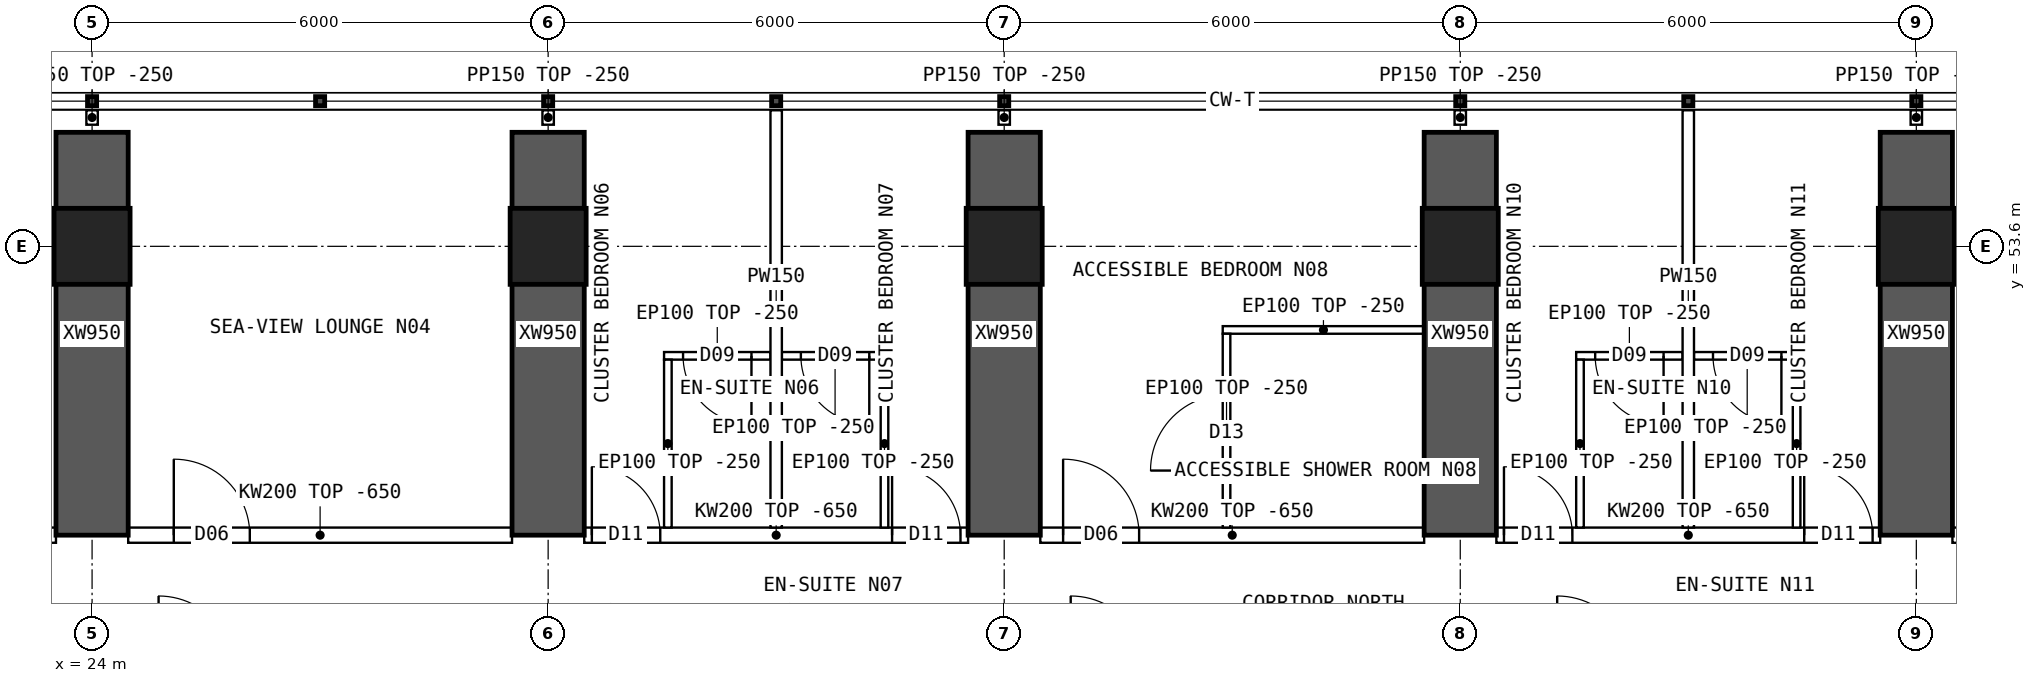
"""IFC4 building model, lengths in metres.
Left out: names, types, materials, properties, quantities, classifications, styles, units other than length and angle.
Written with IfcOpenShell. Run it as: python <this file> out.ifc"""

import sys

from ifc_helpers import new_model, si_unit, direction, frame, frame_2d, origin, origin_2d, place, context, subcontext, project, spatial, polyline, rectangle, hollow_rectangle, outline, extrude, element, fill, save


model = new_model("IFC4")
c1 = context("Model", 3, precision=1e-05, world=origin(), true_north=direction((0.0, 1.0)))
c2 = subcontext(c1, "Body", "Model", "MODEL_VIEW")
j1 = project(units=[si_unit("LENGTHUNIT", "METRE"), si_unit("PLANEANGLEUNIT", "RADIAN")], contexts=[c1])
p1 = place(None, origin())
s1 = spatial("IfcSite", under=j1, at=p1, CompositionType="ELEMENT")
p2 = place(p1, origin())
s2 = spatial("IfcBuilding", under=s1, at=p2, CompositionType="ELEMENT")
p3 = place(p2, frame((0.0, 0.0, 99.4)))
s3 = spatial("IfcBuildingStorey", under=s2, at=p3, CompositionType="ELEMENT", Elevation=99.4)
for number, where, z_axis, x_axis in (
    (1, (24.0, 53.6, 0.0), (0.0, 0.0, 1.0), (1.0, 0.0, 0.0)),
    (2, (30.0, 53.6, 0.0), (0.0, 0.0, 1.0), (1.0, 0.0, 0.0)),
    (3, (36.0, 53.6, 0.0), (0.0, 0.0, 1.0), (1.0, 0.0, 0.0)),
    (4, (42.0, 53.6, 0.0), (0.0, 0.0, 1.0), (1.0, 0.0, 0.0)),
    (5, (48.0, 53.6, 0.0), (0.0, 0.0, 1.0), (1.0, 0.0, 0.0)),
):
    element("IfcColumn", number, at=place(p3, frame(where, z_axis=z_axis, x_axis=x_axis)), inside=s3, PredefinedType="COLUMN", context=c2, shape_type="SweptSolid", body=[
        extrude(hollow_rectangle(XDim=1.0, YDim=1.0, WallThickness=0.1, at=origin_2d()), origin(), (0.0, 0.0, 1.0), 3.75),
    ])
for number, where, z_axis, x_axis in (
    (6, (24.0, 49.8, 0.0), (0.0, 0.0, 1.0), (0.0, 1.0, 0.0)),
    (7, (30.0, 49.8, 0.0), (0.0, 0.0, 1.0), (0.0, 1.0, 0.0)),
    (8, (36.0, 49.8, 0.0), (0.0, 0.0, 1.0), (0.0, 1.0, 0.0)),
    (9, (42.0, 49.8, 0.0), (0.0, 0.0, 1.0), (0.0, 1.0, 0.0)),
    (10, (48.0, 49.8, 0.0), (0.0, 0.0, 1.0), (0.0, 1.0, 0.0)),
):
    element("IfcWall", number, at=place(p3, frame(where, z_axis=z_axis, x_axis=x_axis)), inside=s3, PredefinedType="SHEAR", context=c2, shape_type="SweptSolid", body=[
        extrude(rectangle(XDim=5.3, YDim=0.95, at=frame_2d((2.65, 0.0))), origin(), (0.0, 0.0, 1.0), 3.75),
    ])
p4 = place(p3, frame((18.475, 49.8, 0.0), z_axis=(0.0, 0.0, 1.0), x_axis=(1.0, 0.0, 0.0)))
e11 = element("IfcWall", 11, at=p4, inside=s3, PredefinedType="SOLIDWALL", context=c2, shape_type="SweptSolid", body=[
    extrude(outline(polyline([(0.0, 0.0), (5.05, 0.0), (5.05, 3.1), (0.0, 3.1), (0.0, 0.0)])), frame((0.0, 0.1, 0.0), z_axis=(0.0, -1.0, 0.0), x_axis=(1.0, 0.0, 0.0)), (0.0, 0.0, 1.0), 0.2),
])
p5 = place(p4, frame((0.1, 0.0, 0.0)))
e12 = element("IfcOpeningElement", 12, at=p5, cuts=e11, PredefinedType="OPENING", context=c2, shape_type="SweptSolid", body=[
    extrude(rectangle(XDim=0.9, YDim=2.1, at=frame_2d((0.45, 1.05))), frame((0.0, 0.11, 0.0), z_axis=(0.0, -1.0, 0.0), x_axis=(1.0, 0.0, 0.0)), (0.0, 0.0, 1.0), 0.22),
])
p6 = place(p4, frame((4.05, 0.0, 0.0)))
e13 = element("IfcOpeningElement", 13, at=p6, cuts=e11, PredefinedType="OPENING", context=c2, shape_type="SweptSolid", body=[
    extrude(rectangle(XDim=0.9, YDim=2.1, at=frame_2d((0.45, 1.05))), frame((0.0, 0.11, 0.0), z_axis=(0.0, -1.0, 0.0), x_axis=(1.0, 0.0, 0.0)), (0.0, 0.0, 1.0), 0.22),
])
p7 = place(p3, frame((24.475, 49.8, 0.0), z_axis=(0.0, 0.0, 1.0), x_axis=(1.0, 0.0, 0.0)))
e14 = element("IfcWall", 14, at=p7, inside=s3, PredefinedType="SOLIDWALL", context=c2, shape_type="SweptSolid", body=[
    extrude(outline(polyline([(0.0, 0.0), (5.05, 0.0), (5.05, 3.1), (0.0, 3.1), (0.0, 0.0)])), frame((0.0, 0.1, 0.0), z_axis=(0.0, -1.0, 0.0), x_axis=(1.0, 0.0, 0.0)), (0.0, 0.0, 1.0), 0.2),
])
p8 = place(p7, frame((0.6, 0.0, 0.0)))
e15 = element("IfcOpeningElement", 15, at=p8, cuts=e14, PredefinedType="OPENING", context=c2, shape_type="SweptSolid", body=[
    extrude(rectangle(XDim=1.0, YDim=2.1, at=frame_2d((0.5, 1.05))), frame((0.0, 0.11, 0.0), z_axis=(0.0, -1.0, 0.0), x_axis=(1.0, 0.0, 0.0)), (0.0, 0.0, 1.0), 0.22),
])
p9 = place(p3, frame((30.475, 49.8, 0.0), z_axis=(0.0, 0.0, 1.0), x_axis=(1.0, 0.0, 0.0)))
e16 = element("IfcWall", 16, at=p9, inside=s3, PredefinedType="SOLIDWALL", context=c2, shape_type="SweptSolid", body=[
    extrude(outline(polyline([(0.0, 0.0), (5.05, 0.0), (5.05, 3.1), (0.0, 3.1), (0.0, 0.0)])), frame((0.0, 0.1, 0.0), z_axis=(0.0, -1.0, 0.0), x_axis=(1.0, 0.0, 0.0)), (0.0, 0.0, 1.0), 0.2),
])
p10 = place(p9, frame((0.1, 0.0, 0.0)))
e17 = element("IfcOpeningElement", 17, at=p10, cuts=e16, PredefinedType="OPENING", context=c2, shape_type="SweptSolid", body=[
    extrude(rectangle(XDim=0.9, YDim=2.1, at=frame_2d((0.45, 1.05))), frame((0.0, 0.11, 0.0), z_axis=(0.0, -1.0, 0.0), x_axis=(1.0, 0.0, 0.0)), (0.0, 0.0, 1.0), 0.22),
])
p11 = place(p9, frame((4.05, 0.0, 0.0)))
e18 = element("IfcOpeningElement", 18, at=p11, cuts=e16, PredefinedType="OPENING", context=c2, shape_type="SweptSolid", body=[
    extrude(rectangle(XDim=0.9, YDim=2.1, at=frame_2d((0.45, 1.05))), frame((0.0, 0.11, 0.0), z_axis=(0.0, -1.0, 0.0), x_axis=(1.0, 0.0, 0.0)), (0.0, 0.0, 1.0), 0.22),
])
p12 = place(p3, frame((36.475, 49.8, 0.0), z_axis=(0.0, 0.0, 1.0), x_axis=(1.0, 0.0, 0.0)))
e19 = element("IfcWall", 19, at=p12, inside=s3, PredefinedType="SOLIDWALL", context=c2, shape_type="SweptSolid", body=[
    extrude(outline(polyline([(0.0, 0.0), (5.05, 0.0), (5.05, 3.1), (0.0, 3.1), (0.0, 0.0)])), frame((0.0, 0.1, 0.0), z_axis=(0.0, -1.0, 0.0), x_axis=(1.0, 0.0, 0.0)), (0.0, 0.0, 1.0), 0.2),
])
p13 = place(p12, frame((0.3, 0.0, 0.0)))
e20 = element("IfcOpeningElement", 20, at=p13, cuts=e19, PredefinedType="OPENING", context=c2, shape_type="SweptSolid", body=[
    extrude(rectangle(XDim=1.0, YDim=2.1, at=frame_2d((0.5, 1.05))), frame((0.0, 0.11, 0.0), z_axis=(0.0, -1.0, 0.0), x_axis=(1.0, 0.0, 0.0)), (0.0, 0.0, 1.0), 0.22),
])
p14 = place(p3, frame((42.475, 49.8, 0.0), z_axis=(0.0, 0.0, 1.0), x_axis=(1.0, 0.0, 0.0)))
e21 = element("IfcWall", 21, at=p14, inside=s3, PredefinedType="SOLIDWALL", context=c2, shape_type="SweptSolid", body=[
    extrude(outline(polyline([(0.0, 0.0), (5.05, 0.0), (5.05, 3.1), (0.0, 3.1), (0.0, 0.0)])), frame((0.0, 0.1, 0.0), z_axis=(0.0, -1.0, 0.0), x_axis=(1.0, 0.0, 0.0)), (0.0, 0.0, 1.0), 0.2),
])
p15 = place(p14, frame((0.1, 0.0, 0.0)))
e22 = element("IfcOpeningElement", 22, at=p15, cuts=e21, PredefinedType="OPENING", context=c2, shape_type="SweptSolid", body=[
    extrude(rectangle(XDim=0.9, YDim=2.1, at=frame_2d((0.45, 1.05))), frame((0.0, 0.11, 0.0), z_axis=(0.0, -1.0, 0.0), x_axis=(1.0, 0.0, 0.0)), (0.0, 0.0, 1.0), 0.22),
])
p16 = place(p14, frame((4.05, 0.0, 0.0)))
e23 = element("IfcOpeningElement", 23, at=p16, cuts=e21, PredefinedType="OPENING", context=c2, shape_type="SweptSolid", body=[
    extrude(rectangle(XDim=0.9, YDim=2.1, at=frame_2d((0.45, 1.05))), frame((0.0, 0.11, 0.0), z_axis=(0.0, -1.0, 0.0), x_axis=(1.0, 0.0, 0.0)), (0.0, 0.0, 1.0), 0.22),
])
p17 = place(p3, frame((48.475, 49.8, 0.0), z_axis=(0.0, 0.0, 1.0), x_axis=(1.0, 0.0, 0.0)))
e24 = element("IfcWall", 24, at=p17, inside=s3, PredefinedType="SOLIDWALL", context=c2, shape_type="SweptSolid", body=[
    extrude(outline(polyline([(0.0, 0.0), (5.05, 0.0), (5.05, 3.1), (0.0, 3.1), (0.0, 0.0)])), frame((0.0, 0.1, 0.0), z_axis=(0.0, -1.0, 0.0), x_axis=(1.0, 0.0, 0.0)), (0.0, 0.0, 1.0), 0.2),
])
p18 = place(p17, frame((0.6, 0.0, 0.0)))
e25 = element("IfcOpeningElement", 25, at=p18, cuts=e24, PredefinedType="OPENING", context=c2, shape_type="SweptSolid", body=[
    extrude(rectangle(XDim=1.0, YDim=2.1, at=frame_2d((0.5, 1.05))), frame((0.0, 0.11, 0.0), z_axis=(0.0, -1.0, 0.0), x_axis=(1.0, 0.0, 0.0)), (0.0, 0.0, 1.0), 0.22),
])
p19 = place(p3, frame((33.0, 55.39, 0.0), z_axis=(0.0, 0.0, 1.0), x_axis=(0.0, -1.0, 0.0)))
e26 = element("IfcWall", 26, at=p19, inside=s3, PredefinedType="PARTITIONING", context=c2, shape_type="SweptSolid", body=[
    extrude(outline(polyline([(0.0, 0.0), (5.49, 0.0), (5.49, 3.1), (5.442, 3.1), (5.44, 3.5), (1.992, 3.5), (1.99, 3.1), (1.592, 3.1), (1.59, 3.5), (0.0, 3.5), (0.0, 0.0)])), frame((0.0, 0.075, 0.0), z_axis=(0.0, -1.0, 0.0), x_axis=(1.0, 0.0, 0.0)), (0.0, 0.0, 1.0), 0.15),
])
p20 = place(p3, frame((31.525, 52.159, 0.0), z_axis=(0.0, 0.0, 1.0), x_axis=(1.0, 0.0, 0.0)))
e27 = element("IfcWall", 27, at=p20, inside=s3, PredefinedType="PARTITIONING", context=c2, shape_type="SweptSolid", body=[
    extrude(rectangle(XDim=1.4, YDim=0.1, at=frame_2d((0.7, 0.0))), origin(), (0.0, 0.0, 1.0), 3.5),
])
p21 = place(p20, frame((0.25, 0.0, 0.0)))
e28 = element("IfcOpeningElement", 28, at=p21, cuts=e27, PredefinedType="OPENING", context=c2, shape_type="SweptSolid", body=[
    extrude(rectangle(XDim=0.9, YDim=2.1, at=frame_2d((0.45, 1.05))), frame((0.0, 0.06, 0.0), z_axis=(0.0, -1.0, 0.0), x_axis=(1.0, 0.0, 0.0)), (0.0, 0.0, 1.0), 0.12),
])
p22 = place(p3, frame((31.575, 52.109, 0.0), z_axis=(0.0, 0.0, 1.0), x_axis=(0.0, -1.0, 0.0)))
e29 = element("IfcWall", 29, at=p22, inside=s3, PredefinedType="PARTITIONING", context=c2, shape_type="SweptSolid", body=[
    extrude(outline(polyline([(0.0, 0.0), (2.209, 0.0), (2.209, 3.1), (2.161, 3.1), (2.159, 3.5), (0.0, 3.5), (0.0, 0.0)])), frame((0.0, 0.05, 0.0), z_axis=(0.0, -1.0, 0.0), x_axis=(1.0, 0.0, 0.0)), (0.0, 0.0, 1.0), 0.1),
])
p23 = place(p3, frame((33.075, 52.159, 0.0), z_axis=(0.0, 0.0, 1.0), x_axis=(1.0, 0.0, 0.0)))
e30 = element("IfcWall", 30, at=p23, inside=s3, PredefinedType="PARTITIONING", context=c2, shape_type="SweptSolid", body=[
    extrude(rectangle(XDim=1.4, YDim=0.1, at=frame_2d((0.7, 0.0))), origin(), (0.0, 0.0, 1.0), 3.5),
])
p24 = place(p23, frame((0.25, 0.0, 0.0)))
e31 = element("IfcOpeningElement", 31, at=p24, cuts=e30, PredefinedType="OPENING", context=c2, shape_type="SweptSolid", body=[
    extrude(rectangle(XDim=0.9, YDim=2.1, at=frame_2d((0.45, 1.05))), frame((0.0, 0.06, 0.0), z_axis=(0.0, -1.0, 0.0), x_axis=(1.0, 0.0, 0.0)), (0.0, 0.0, 1.0), 0.12),
])
p25 = place(p3, frame((34.425, 52.109, 0.0), z_axis=(0.0, 0.0, 1.0), x_axis=(0.0, -1.0, 0.0)))
e32 = element("IfcWall", 32, at=p25, inside=s3, PredefinedType="PARTITIONING", context=c2, shape_type="SweptSolid", body=[
    extrude(outline(polyline([(0.0, 0.0), (2.209, 0.0), (2.209, 3.1), (2.161, 3.1), (2.159, 3.5), (0.0, 3.5), (0.0, 0.0)])), frame((0.0, 0.05, 0.0), z_axis=(0.0, -1.0, 0.0), x_axis=(1.0, 0.0, 0.0)), (0.0, 0.0, 1.0), 0.1),
])
p26 = place(p3, frame((38.875, 52.5, 0.0), z_axis=(0.0, 0.0, 1.0), x_axis=(1.0, 0.0, 0.0)))
e33 = element("IfcWall", 33, at=p26, inside=s3, PredefinedType="PARTITIONING", context=c2, shape_type="SweptSolid", body=[
    extrude(rectangle(XDim=2.65, YDim=0.1, at=frame_2d((1.325, 0.0))), origin(), (0.0, 0.0, 1.0), 3.5),
])
p27 = place(p3, frame((38.925, 52.45, 0.0), z_axis=(0.0, 0.0, 1.0), x_axis=(0.0, -1.0, 0.0)))
e34 = element("IfcWall", 34, at=p27, inside=s3, PredefinedType="PARTITIONING", context=c2, shape_type="SweptSolid", body=[
    extrude(outline(polyline([(0.0, 0.0), (2.55, 0.0), (2.55, 3.1), (2.502, 3.1), (2.5, 3.5), (0.0, 3.5), (0.0, 0.0)])), frame((0.0, 0.05, 0.0), z_axis=(0.0, -1.0, 0.0), x_axis=(1.0, 0.0, 0.0)), (0.0, 0.0, 1.0), 0.1),
])
p28 = place(p27, frame((0.8, 0.0, 0.0)))
e35 = element("IfcOpeningElement", 35, at=p28, cuts=e34, PredefinedType="OPENING", context=c2, shape_type="SweptSolid", body=[
    extrude(rectangle(XDim=1.0, YDim=2.1, at=frame_2d((0.5, 1.05))), frame((0.0, 0.06, 0.0), z_axis=(0.0, -1.0, 0.0), x_axis=(1.0, 0.0, 0.0)), (0.0, 0.0, 1.0), 0.12),
])
p29 = place(p3, frame((45.0, 55.39, 0.0), z_axis=(0.0, 0.0, 1.0), x_axis=(0.0, -1.0, 0.0)))
e36 = element("IfcWall", 36, at=p29, inside=s3, PredefinedType="PARTITIONING", context=c2, shape_type="SweptSolid", body=[
    extrude(outline(polyline([(0.0, 0.0), (5.49, 0.0), (5.49, 3.1), (5.442, 3.1), (5.44, 3.5), (1.992, 3.5), (1.99, 3.1), (1.592, 3.1), (1.59, 3.5), (0.0, 3.5), (0.0, 0.0)])), frame((0.0, 0.075, 0.0), z_axis=(0.0, -1.0, 0.0), x_axis=(1.0, 0.0, 0.0)), (0.0, 0.0, 1.0), 0.15),
])
p30 = place(p3, frame((43.525, 52.159, 0.0), z_axis=(0.0, 0.0, 1.0), x_axis=(1.0, 0.0, 0.0)))
e37 = element("IfcWall", 37, at=p30, inside=s3, PredefinedType="PARTITIONING", context=c2, shape_type="SweptSolid", body=[
    extrude(rectangle(XDim=1.4, YDim=0.1, at=frame_2d((0.7, 0.0))), origin(), (0.0, 0.0, 1.0), 3.5),
])
p31 = place(p30, frame((0.25, 0.0, 0.0)))
e38 = element("IfcOpeningElement", 38, at=p31, cuts=e37, PredefinedType="OPENING", context=c2, shape_type="SweptSolid", body=[
    extrude(rectangle(XDim=0.9, YDim=2.1, at=frame_2d((0.45, 1.05))), frame((0.0, 0.06, 0.0), z_axis=(0.0, -1.0, 0.0), x_axis=(1.0, 0.0, 0.0)), (0.0, 0.0, 1.0), 0.12),
])
p32 = place(p3, frame((43.575, 52.109, 0.0), z_axis=(0.0, 0.0, 1.0), x_axis=(0.0, -1.0, 0.0)))
e39 = element("IfcWall", 39, at=p32, inside=s3, PredefinedType="PARTITIONING", context=c2, shape_type="SweptSolid", body=[
    extrude(outline(polyline([(0.0, 0.0), (2.209, 0.0), (2.209, 3.1), (2.161, 3.1), (2.159, 3.5), (0.0, 3.5), (0.0, 0.0)])), frame((0.0, 0.05, 0.0), z_axis=(0.0, -1.0, 0.0), x_axis=(1.0, 0.0, 0.0)), (0.0, 0.0, 1.0), 0.1),
])
p33 = place(p3, frame((45.075, 52.159, 0.0), z_axis=(0.0, 0.0, 1.0), x_axis=(1.0, 0.0, 0.0)))
e40 = element("IfcWall", 40, at=p33, inside=s3, PredefinedType="PARTITIONING", context=c2, shape_type="SweptSolid", body=[
    extrude(rectangle(XDim=1.4, YDim=0.1, at=frame_2d((0.7, 0.0))), origin(), (0.0, 0.0, 1.0), 3.5),
])
p34 = place(p33, frame((0.25, 0.0, 0.0)))
e41 = element("IfcOpeningElement", 41, at=p34, cuts=e40, PredefinedType="OPENING", context=c2, shape_type="SweptSolid", body=[
    extrude(rectangle(XDim=0.9, YDim=2.1, at=frame_2d((0.45, 1.05))), frame((0.0, 0.06, 0.0), z_axis=(0.0, -1.0, 0.0), x_axis=(1.0, 0.0, 0.0)), (0.0, 0.0, 1.0), 0.12),
])
p35 = place(p3, frame((46.425, 52.109, 0.0), z_axis=(0.0, 0.0, 1.0), x_axis=(0.0, -1.0, 0.0)))
e42 = element("IfcWall", 42, at=p35, inside=s3, PredefinedType="PARTITIONING", context=c2, shape_type="SweptSolid", body=[
    extrude(outline(polyline([(0.0, 0.0), (2.209, 0.0), (2.209, 3.1), (2.161, 3.1), (2.159, 3.5), (0.0, 3.5), (0.0, 0.0)])), frame((0.0, 0.05, 0.0), z_axis=(0.0, -1.0, 0.0), x_axis=(1.0, 0.0, 0.0)), (0.0, 0.0, 1.0), 0.1),
])
for number, where, z_axis, x_axis in (
    (43, (24.0, 55.2, 0.0), (0.0, 0.0, 1.0), (0.0, 1.0, 0.0)),
    (44, (30.0, 55.2, 0.0), (0.0, 0.0, 1.0), (0.0, 1.0, 0.0)),
    (45, (36.0, 55.2, 0.0), (0.0, 0.0, 1.0), (0.0, 1.0, 0.0)),
    (46, (42.0, 55.2, 0.0), (0.0, 0.0, 1.0), (0.0, 1.0, 0.0)),
    (47, (48.0, 55.2, 0.0), (0.0, 0.0, 1.0), (0.0, 1.0, 0.0)),
):
    element("IfcWall", number, at=place(p3, frame(where, z_axis=z_axis, x_axis=x_axis)), inside=s3, PredefinedType="PARTITIONING", context=c2, shape_type="SweptSolid", body=[
        extrude(rectangle(XDim=0.19, YDim=0.15, at=frame_2d((0.095, 0.0))), origin(), (0.0, 0.0, 1.0), 3.5),
    ])
p36 = place(p8, origin())
e48 = element("IfcDoor", 48, at=p36, inside=s3, OperationType="SINGLE_SWING_LEFT", PredefinedType="DOOR", context=c2, shape_type="SweptSolid", body=[
    extrude(rectangle(XDim=1.0, YDim=2.1, at=frame_2d((0.5, 1.05))), frame((0.0, 0.025, 0.0), z_axis=(0.0, -1.0, 0.0), x_axis=(1.0, 0.0, 0.0)), (0.0, 0.0, 1.0), 0.05),
])
fill(e15, e48)
p37 = place(p21, origin())
e49 = element("IfcDoor", 49, at=p37, inside=s3, OperationType="SINGLE_SWING_RIGHT", PredefinedType="DOOR", context=c2, shape_type="SweptSolid", body=[
    extrude(rectangle(XDim=0.9, YDim=2.1, at=frame_2d((0.45, 1.05))), frame((0.0, 0.025, 0.0), z_axis=(0.0, -1.0, 0.0), x_axis=(1.0, 0.0, 0.0)), (0.0, 0.0, 1.0), 0.05),
])
fill(e28, e49)
p38 = place(p10, origin())
e50 = element("IfcDoor", 50, at=p38, inside=s3, OperationType="SINGLE_SWING_LEFT", PredefinedType="DOOR", context=c2, shape_type="SweptSolid", body=[
    extrude(rectangle(XDim=0.9, YDim=2.1, at=frame_2d((0.45, 1.05))), frame((0.0, 0.025, 0.0), z_axis=(0.0, -1.0, 0.0), x_axis=(1.0, 0.0, 0.0)), (0.0, 0.0, 1.0), 0.05),
])
fill(e17, e50)
p39 = place(p24, origin())
e51 = element("IfcDoor", 51, at=p39, inside=s3, OperationType="SINGLE_SWING_RIGHT", PredefinedType="DOOR", context=c2, shape_type="SweptSolid", body=[
    extrude(rectangle(XDim=0.9, YDim=2.1, at=frame_2d((0.45, 1.05))), frame((0.0, 0.025, 0.0), z_axis=(0.0, -1.0, 0.0), x_axis=(1.0, 0.0, 0.0)), (0.0, 0.0, 1.0), 0.05),
])
fill(e31, e51)
p40 = place(p11, origin())
e52 = element("IfcDoor", 52, at=p40, inside=s3, OperationType="SINGLE_SWING_LEFT", PredefinedType="DOOR", context=c2, shape_type="SweptSolid", body=[
    extrude(rectangle(XDim=0.9, YDim=2.1, at=frame_2d((0.45, 1.05))), frame((0.0, 0.025, 0.0), z_axis=(0.0, -1.0, 0.0), x_axis=(1.0, 0.0, 0.0)), (0.0, 0.0, 1.0), 0.05),
])
fill(e18, e52)
p41 = place(p28, origin())
e53 = element("IfcDoor", 53, at=p41, inside=s3, OperationType="SINGLE_SWING_RIGHT", PredefinedType="DOOR", context=c2, shape_type="SweptSolid", body=[
    extrude(rectangle(XDim=1.0, YDim=2.1, at=frame_2d((0.5, 1.05))), frame((0.0, 0.025, 0.0), z_axis=(0.0, -1.0, 0.0), x_axis=(1.0, 0.0, 0.0)), (0.0, 0.0, 1.0), 0.05),
])
fill(e35, e53)
p42 = place(p13, origin())
e54 = element("IfcDoor", 54, at=p42, inside=s3, OperationType="SINGLE_SWING_LEFT", PredefinedType="DOOR", context=c2, shape_type="SweptSolid", body=[
    extrude(rectangle(XDim=1.0, YDim=2.1, at=frame_2d((0.5, 1.05))), frame((0.0, 0.025, 0.0), z_axis=(0.0, -1.0, 0.0), x_axis=(1.0, 0.0, 0.0)), (0.0, 0.0, 1.0), 0.05),
])
fill(e20, e54)
p43 = place(p31, origin())
e55 = element("IfcDoor", 55, at=p43, inside=s3, OperationType="SINGLE_SWING_RIGHT", PredefinedType="DOOR", context=c2, shape_type="SweptSolid", body=[
    extrude(rectangle(XDim=0.9, YDim=2.1, at=frame_2d((0.45, 1.05))), frame((0.0, 0.025, 0.0), z_axis=(0.0, -1.0, 0.0), x_axis=(1.0, 0.0, 0.0)), (0.0, 0.0, 1.0), 0.05),
])
fill(e38, e55)
p44 = place(p15, origin())
e56 = element("IfcDoor", 56, at=p44, inside=s3, OperationType="SINGLE_SWING_LEFT", PredefinedType="DOOR", context=c2, shape_type="SweptSolid", body=[
    extrude(rectangle(XDim=0.9, YDim=2.1, at=frame_2d((0.45, 1.05))), frame((0.0, 0.025, 0.0), z_axis=(0.0, -1.0, 0.0), x_axis=(1.0, 0.0, 0.0)), (0.0, 0.0, 1.0), 0.05),
])
fill(e22, e56)
p45 = place(p34, origin())
e57 = element("IfcDoor", 57, at=p45, inside=s3, OperationType="SINGLE_SWING_RIGHT", PredefinedType="DOOR", context=c2, shape_type="SweptSolid", body=[
    extrude(rectangle(XDim=0.9, YDim=2.1, at=frame_2d((0.45, 1.05))), frame((0.0, 0.025, 0.0), z_axis=(0.0, -1.0, 0.0), x_axis=(1.0, 0.0, 0.0)), (0.0, 0.0, 1.0), 0.05),
])
fill(e41, e57)
p46 = place(p16, origin())
e58 = element("IfcDoor", 58, at=p46, inside=s3, OperationType="SINGLE_SWING_LEFT", PredefinedType="DOOR", context=c2, shape_type="SweptSolid", body=[
    extrude(rectangle(XDim=0.9, YDim=2.1, at=frame_2d((0.45, 1.05))), frame((0.0, 0.025, 0.0), z_axis=(0.0, -1.0, 0.0), x_axis=(1.0, 0.0, 0.0)), (0.0, 0.0, 1.0), 0.05),
])
fill(e23, e58)
save(model, sys.argv[1])
